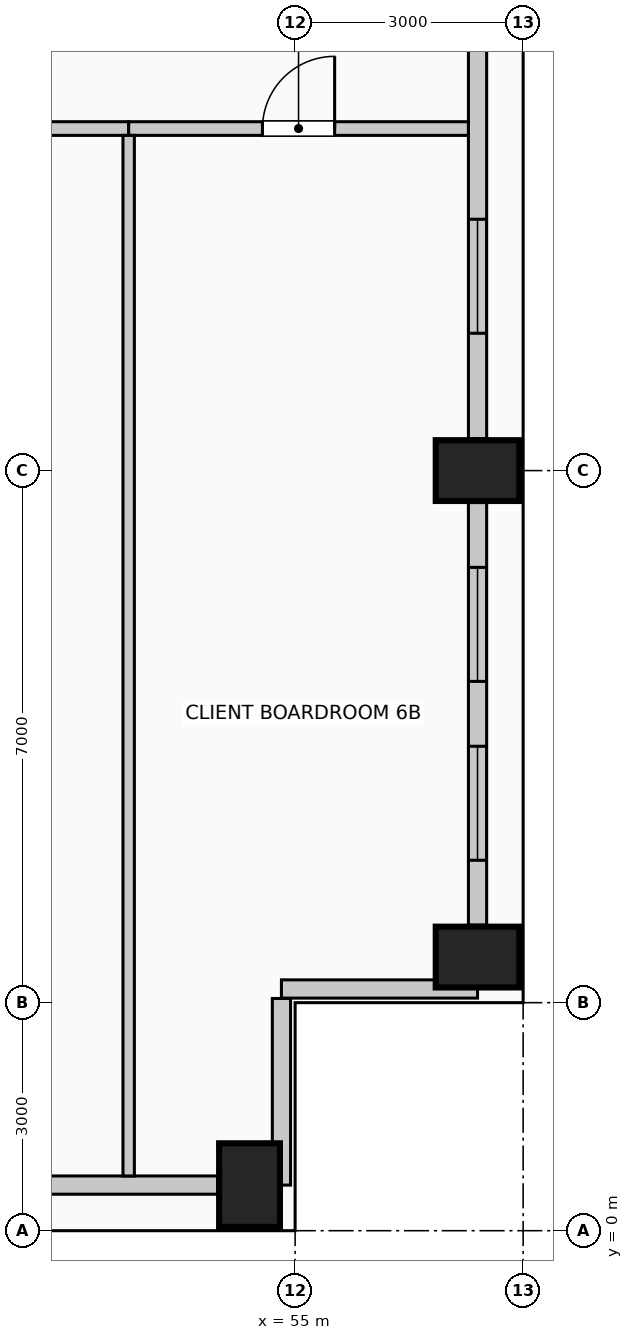
"""IFC4 building model, lengths in metres.
Left out: names, types, materials, properties, quantities, classifications, styles, units other than length and angle.
Written with IfcOpenShell. Run it as: python <this file> out.ifc"""

import sys

from ifc_helpers import new_model, si_unit, direction, frame, frame_2d, origin, origin_2d, place, context, subcontext, project, spatial, rectangle, extrude, element, fill, save


model = new_model("IFC4")
c1 = context("Model", 3, precision=1e-05, world=origin(), true_north=direction((0.0, 1.0)))
c2 = subcontext(c1, "Body", "Model", "MODEL_VIEW")
j1 = project(units=[si_unit("LENGTHUNIT", "METRE"), si_unit("PLANEANGLEUNIT", "RADIAN")], contexts=[c1])
p1 = place(None, origin())
s1 = spatial("IfcSite", under=j1, at=p1, CompositionType="ELEMENT")
p2 = place(p1, origin())
s2 = spatial("IfcBuilding", under=s1, at=p2, CompositionType="ELEMENT")
p3 = place(p2, frame((0.0, 0.0, 202.6)))
s3 = spatial("IfcBuildingStorey", under=s2, at=p3, CompositionType="ELEMENT", Elevation=202.6)
for number, where, z_axis, x_axis in (
    (1, (54.4, 0.6, 0.0), (0.0, 0.0, 1.0), (1.0, 0.0, 0.0)),
    (2, (57.4, 3.6, 0.0), (0.0, 0.0, 1.0), (0.0, 1.0, 0.0)),
    (3, (57.4, 10.0, 0.0), (0.0, 0.0, 1.0), (0.0, 1.0, 0.0)),
):
    element("IfcColumn", number, at=place(p3, frame(where, z_axis=z_axis, x_axis=x_axis)), inside=s3, PredefinedType="COLUMN", context=c2, shape_type="SweptSolid", body=[
        extrude(rectangle(XDim=0.8, YDim=1.1, at=origin_2d()), origin(), (0.0, 0.0, 1.0), 4.0),
    ])
p4 = place(p3, frame((53.98, 0.6, 0.0), z_axis=(0.0, 0.0, 1.0), x_axis=(-1.0, 0.0, 0.0)))
e4 = element("IfcWall", 4, at=p4, inside=s3, PredefinedType="SOLIDWALL", context=c2, shape_type="SweptSolid", body=[
    extrude(rectangle(XDim=4.06, YDim=0.24, at=frame_2d((2.03, 0.0))), origin(), (0.0, 0.0, 1.0), 3.0),
])
p5 = place(p3, frame((57.4, 9.58, 0.0), z_axis=(0.0, 0.0, 1.0), x_axis=(0.0, -1.0, 0.0)))
e5 = element("IfcWall", 5, at=p5, inside=s3, PredefinedType="SOLIDWALL", context=c2, shape_type="SweptSolid", body=[
    extrude(rectangle(XDim=5.56, YDim=0.24, at=frame_2d((2.78, 0.0))), origin(), (0.0, 0.0, 1.0), 3.0),
])
p6 = place(p5, frame((0.853, 0.0, 0.42)))
e6 = element("IfcOpeningElement", 6, at=p6, cuts=e5, PredefinedType="OPENING", context=c2, shape_type="SweptSolid", body=[
    extrude(rectangle(XDim=1.5, YDim=2.2, at=frame_2d((0.75, 1.1))), frame((0.0, 0.13, 0.0), z_axis=(0.0, -1.0, 0.0), x_axis=(1.0, 0.0, 0.0)), (0.0, 0.0, 1.0), 0.26),
])
p7 = place(p5, frame((3.207, 0.0, 0.42)))
e7 = element("IfcOpeningElement", 7, at=p7, cuts=e5, PredefinedType="OPENING", context=c2, shape_type="SweptSolid", body=[
    extrude(rectangle(XDim=1.5, YDim=2.2, at=frame_2d((0.75, 1.1))), frame((0.0, 0.13, 0.0), z_axis=(0.0, -1.0, 0.0), x_axis=(1.0, 0.0, 0.0)), (0.0, 0.0, 1.0), 0.26),
])
p8 = place(p3, frame((57.4, 17.58, 0.0), z_axis=(0.0, 0.0, 1.0), x_axis=(0.0, -1.0, 0.0)))
e8 = element("IfcWall", 8, at=p8, inside=s3, PredefinedType="SOLIDWALL", context=c2, shape_type="SweptSolid", body=[
    extrude(rectangle(XDim=7.16, YDim=0.24, at=frame_2d((3.58, 0.0))), origin(), (0.0, 0.0, 1.0), 3.0),
])
p9 = place(p8, frame((4.273, 0.0, 0.42)))
e9 = element("IfcOpeningElement", 9, at=p9, cuts=e8, PredefinedType="OPENING", context=c2, shape_type="SweptSolid", body=[
    extrude(rectangle(XDim=1.5, YDim=2.2, at=frame_2d((0.75, 1.1))), frame((0.0, 0.13, 0.0), z_axis=(0.0, -1.0, 0.0), x_axis=(1.0, 0.0, 0.0)), (0.0, 0.0, 1.0), 0.26),
])
p10 = place(p3, frame((57.4, 3.18, 0.0), z_axis=(0.0, 0.0, 1.0), x_axis=(-1.0, 0.0, 0.0)))
e10 = element("IfcWall", 10, at=p10, inside=s3, PredefinedType="SOLIDWALL", context=c2, shape_type="SweptSolid", body=[
    extrude(rectangle(XDim=2.58, YDim=0.24, at=frame_2d((1.29, 0.0))), origin(), (0.0, 0.0, 1.0), 3.75),
])
p11 = place(p3, frame((54.82, 3.055, 0.0), z_axis=(0.0, 0.0, 1.0), x_axis=(0.0, -1.0, 0.0)))
e11 = element("IfcWall", 11, at=p11, inside=s3, PredefinedType="SOLIDWALL", context=c2, shape_type="SweptSolid", body=[
    extrude(rectangle(XDim=2.455, YDim=0.24, at=frame_2d((1.228, 0.0))), origin(), (0.0, 0.0, 1.0), 3.75),
])
p12 = place(p3, frame((46.48, 14.5, 0.0), z_axis=(0.0, 0.0, 1.0), x_axis=(1.0, 0.0, 0.0)))
e12 = element("IfcWall", 12, at=p12, inside=s3, PredefinedType="PARTITIONING", context=c2, shape_type="SweptSolid", body=[
    extrude(rectangle(XDim=6.33, YDim=0.18, at=frame_2d((3.165, 0.0))), origin(), (0.0, 0.0, 1.0), 3.75),
])
p13 = place(p12, frame((2.64, 0.0, 0.0)))
e13 = element("IfcOpeningElement", 13, at=p13, cuts=e12, PredefinedType="OPENING", context=c2, shape_type="SweptSolid", body=[
    extrude(rectangle(XDim=1.05, YDim=2.15, at=frame_2d((0.525, 1.075))), frame((0.0, 0.1, 0.0), z_axis=(0.0, -1.0, 0.0), x_axis=(1.0, 0.0, 0.0)), (0.0, 0.0, 1.0), 0.2),
])
p14 = place(p3, frame((52.81, 14.5, 0.0), z_axis=(0.0, 0.0, 1.0), x_axis=(1.0, 0.0, 0.0)))
e14 = element("IfcWall", 14, at=p14, inside=s3, PredefinedType="PARTITIONING", context=c2, shape_type="SweptSolid", body=[
    extrude(rectangle(XDim=4.47, YDim=0.18, at=frame_2d((2.235, 0.0))), origin(), (0.0, 0.0, 1.0), 3.75),
])
p15 = place(p14, frame((1.76, 0.0, 0.0)))
e15 = element("IfcOpeningElement", 15, at=p15, cuts=e14, PredefinedType="OPENING", context=c2, shape_type="SweptSolid", body=[
    extrude(rectangle(XDim=0.95, YDim=2.15, at=frame_2d((0.475, 1.075))), frame((0.0, 0.1, 0.0), z_axis=(0.0, -1.0, 0.0), x_axis=(1.0, 0.0, 0.0)), (0.0, 0.0, 1.0), 0.2),
])
p16 = place(p3, frame((52.81, 0.72, 0.0), z_axis=(0.0, 0.0, 1.0), x_axis=(0.0, 1.0, 0.0)))
e16 = element("IfcWall", 16, at=p16, inside=s3, PredefinedType="PARTITIONING", context=c2, shape_type="SweptSolid", body=[
    extrude(rectangle(XDim=13.69, YDim=0.15, at=frame_2d((6.845, 0.0))), origin(), (0.0, 0.0, 1.0), 3.75),
])
p17 = place(p6, origin())
e17 = element("IfcWindow", 17, at=p17, inside=s3, PartitioningType="SINGLE_PANEL", PredefinedType="WINDOW", context=c2, shape_type="SweptSolid", body=[
    extrude(rectangle(XDim=1.5, YDim=2.2, at=frame_2d((0.75, 1.1))), frame((0.0, 0.03, 0.0), z_axis=(0.0, -1.0, 0.0), x_axis=(1.0, 0.0, 0.0)), (0.0, 0.0, 1.0), 0.06),
])
fill(e6, e17)
p18 = place(p7, origin())
e18 = element("IfcWindow", 18, at=p18, inside=s3, PartitioningType="SINGLE_PANEL", PredefinedType="WINDOW", context=c2, shape_type="SweptSolid", body=[
    extrude(rectangle(XDim=1.5, YDim=2.2, at=frame_2d((0.75, 1.1))), frame((0.0, 0.03, 0.0), z_axis=(0.0, -1.0, 0.0), x_axis=(1.0, 0.0, 0.0)), (0.0, 0.0, 1.0), 0.06),
])
fill(e7, e18)
p19 = place(p9, origin())
e19 = element("IfcWindow", 19, at=p19, inside=s3, PartitioningType="SINGLE_PANEL", PredefinedType="WINDOW", context=c2, shape_type="SweptSolid", body=[
    extrude(rectangle(XDim=1.5, YDim=2.2, at=frame_2d((0.75, 1.1))), frame((0.0, 0.03, 0.0), z_axis=(0.0, -1.0, 0.0), x_axis=(1.0, 0.0, 0.0)), (0.0, 0.0, 1.0), 0.06),
])
fill(e9, e19)
p20 = place(p15, origin())
e20 = element("IfcDoor", 20, at=p20, inside=s3, OperationType="SINGLE_SWING_RIGHT", PredefinedType="DOOR", context=c2, shape_type="SweptSolid", body=[
    extrude(rectangle(XDim=0.95, YDim=2.15, at=frame_2d((0.475, 1.075))), frame((0.0, 0.025, 0.0), z_axis=(0.0, -1.0, 0.0), x_axis=(1.0, 0.0, 0.0)), (0.0, 0.0, 1.0), 0.05),
])
fill(e15, e20)
save(model, sys.argv[1])
